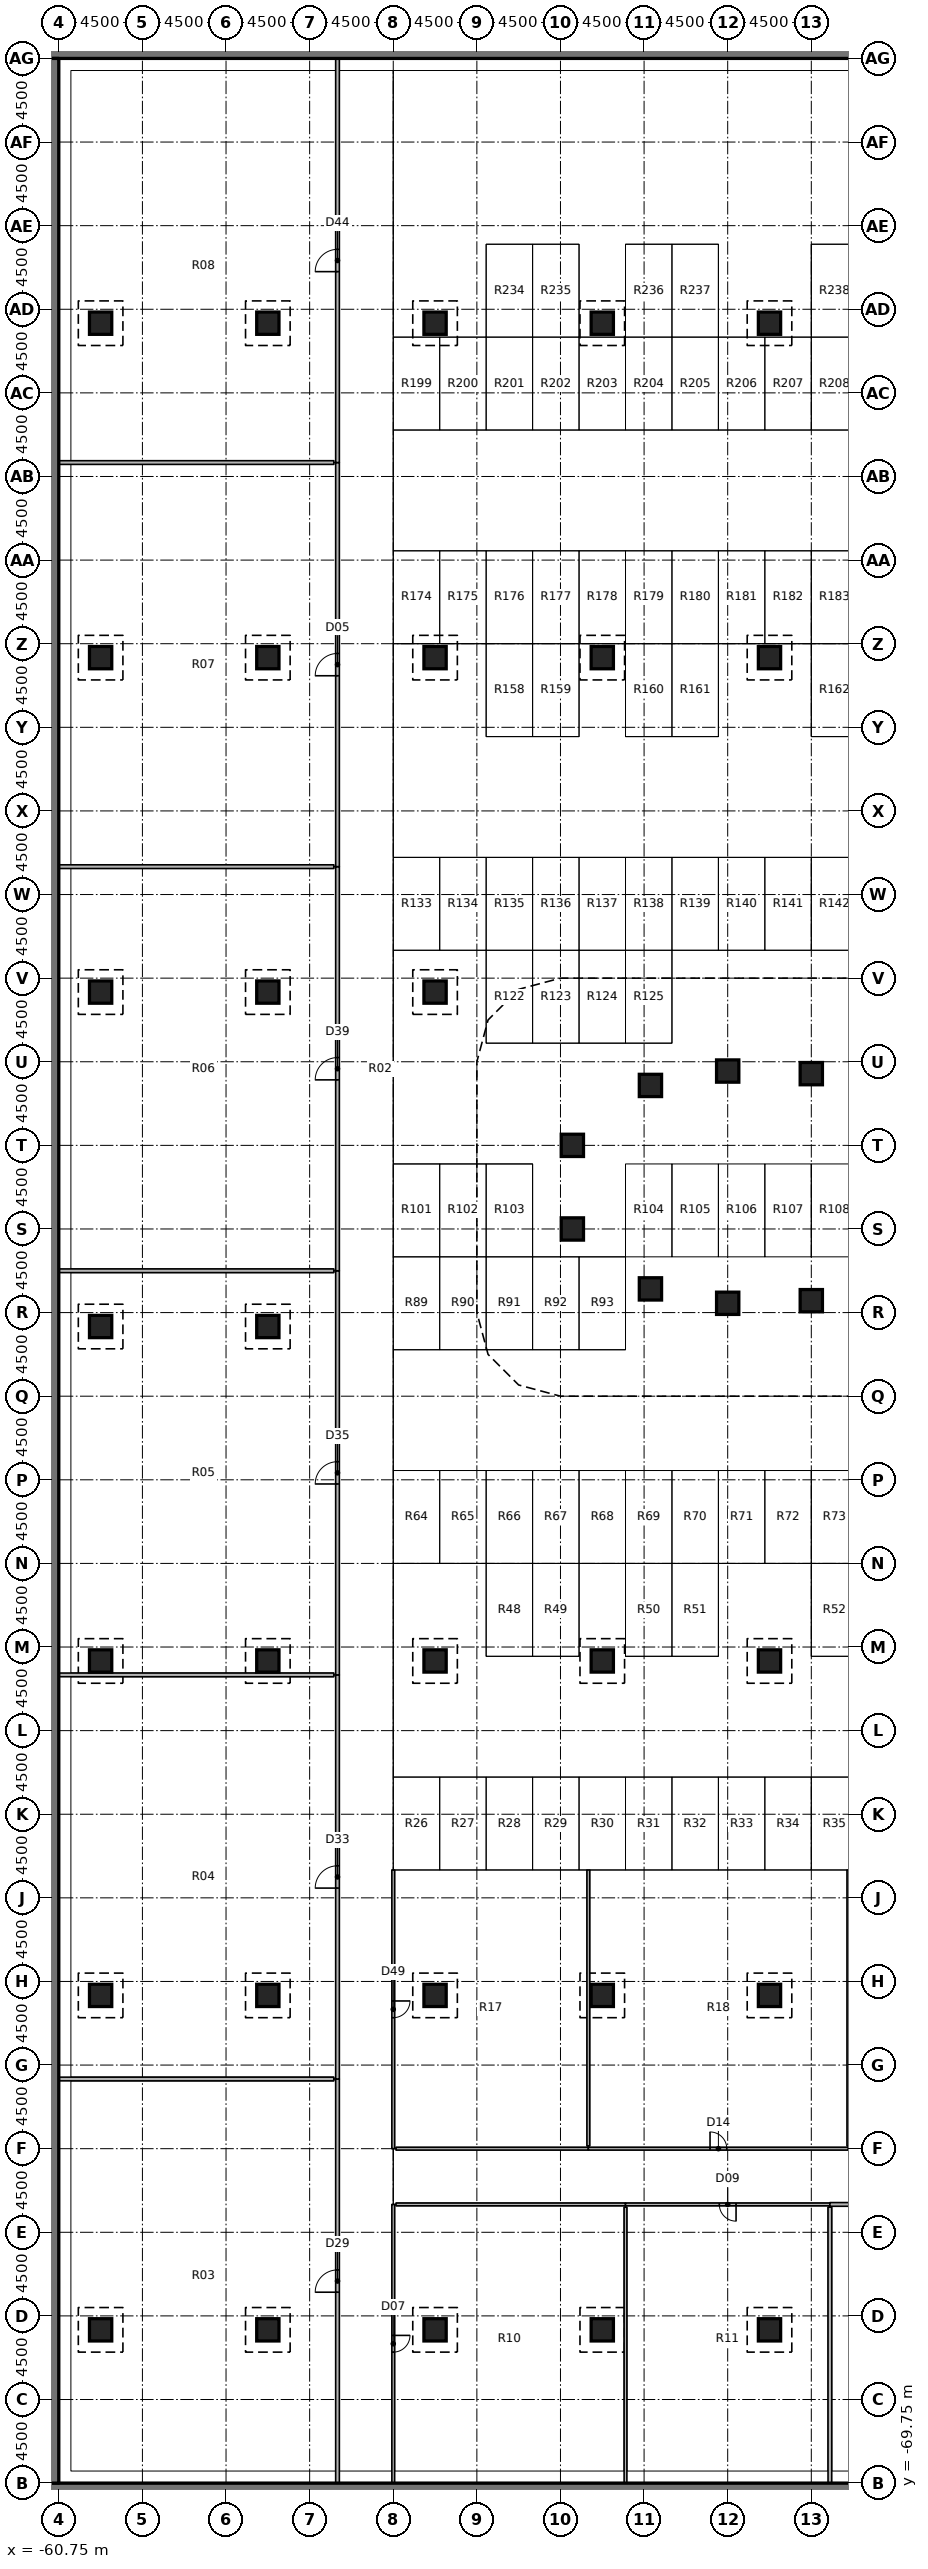
"""IFC4 building model, lengths in metres.
Left out: names, types, materials, properties, quantities, classifications, styles, units other than length and angle.
Written with IfcOpenShell. Run it as: python <this file> out.ifc"""

import sys

from ifc_helpers import new_model, si_unit, direction, frame, frame_2d, origin, origin_2d, place, context, subcontext, project, spatial, rectangle, extrude, element, fill, save


model = new_model("IFC4")
c1 = context("Model", 3, precision=1e-05, world=origin(), true_north=direction((0.0, 1.0)))
c2 = subcontext(c1, "Body", "Model", "MODEL_VIEW")
j1 = project(units=[si_unit("LENGTHUNIT", "METRE"), si_unit("PLANEANGLEUNIT", "RADIAN")], contexts=[c1])
p1 = place(None, origin())
s1 = spatial("IfcSite", under=j1, at=p1, CompositionType="ELEMENT")
p2 = place(p1, origin())
s2 = spatial("IfcBuilding", under=s1, at=p2, CompositionType="ELEMENT")
p3 = place(p2, frame((0.0, 0.0, -8.0)))
s3 = spatial("IfcBuildingStorey", under=s2, at=p3, CompositionType="ELEMENT", Elevation=-8.0)
for number, where, z_axis, x_axis in (
    (1, (-58.5, -61.5, 0.0), (0.0, 0.0, 1.0), (1.0, 0.0, 0.0)),
    (2, (-58.5, -43.5, 0.0), (0.0, 0.0, 1.0), (1.0, 0.0, 0.0)),
    (3, (-58.5, -25.5, 0.0), (0.0, 0.0, 1.0), (1.0, 0.0, 0.0)),
    (4, (-58.5, -7.5, 0.0), (0.0, 0.0, 1.0), (1.0, 0.0, 0.0)),
    (5, (-58.5, 10.5, 0.0), (0.0, 0.0, 1.0), (1.0, 0.0, 0.0)),
    (6, (-58.5, 28.5, 0.0), (0.0, 0.0, 1.0), (1.0, 0.0, 0.0)),
    (7, (-58.5, 46.5, 0.0), (0.0, 0.0, 1.0), (1.0, 0.0, 0.0)),
    (8, (-49.5, -61.5, 0.0), (0.0, 0.0, 1.0), (1.0, 0.0, 0.0)),
    (9, (-49.5, -43.5, 0.0), (0.0, 0.0, 1.0), (1.0, 0.0, 0.0)),
    (10, (-49.5, -25.5, 0.0), (0.0, 0.0, 1.0), (1.0, 0.0, 0.0)),
    (11, (-49.5, -7.5, 0.0), (0.0, 0.0, 1.0), (1.0, 0.0, 0.0)),
    (12, (-49.5, 10.5, 0.0), (0.0, 0.0, 1.0), (1.0, 0.0, 0.0)),
    (13, (-49.5, 28.5, 0.0), (0.0, 0.0, 1.0), (1.0, 0.0, 0.0)),
    (14, (-49.5, 46.5, 0.0), (0.0, 0.0, 1.0), (1.0, 0.0, 0.0)),
    (15, (-40.5, -61.5, 0.0), (0.0, 0.0, 1.0), (1.0, 0.0, 0.0)),
    (16, (-40.5, -43.5, 0.0), (0.0, 0.0, 1.0), (1.0, 0.0, 0.0)),
    (17, (-40.5, -25.5, 0.0), (0.0, 0.0, 1.0), (1.0, 0.0, 0.0)),
    (18, (-40.5, 10.5, 0.0), (0.0, 0.0, 1.0), (1.0, 0.0, 0.0)),
    (19, (-40.5, 28.5, 0.0), (0.0, 0.0, 1.0), (1.0, 0.0, 0.0)),
    (20, (-40.5, 46.5, 0.0), (0.0, 0.0, 1.0), (1.0, 0.0, 0.0)),
    (21, (-33.11, -2.25, 0.0), (0.0, 0.0, 1.0), (1.0, 0.0, 0.0)),
    (22, (-33.11, 2.25, 0.0), (0.0, 0.0, 1.0), (1.0, 0.0, 0.0)),
    (23, (-31.5, -61.5, 0.0), (0.0, 0.0, 1.0), (1.0, 0.0, 0.0)),
    (24, (-31.5, -43.5, 0.0), (0.0, 0.0, 1.0), (1.0, 0.0, 0.0)),
    (25, (-31.5, -25.5, 0.0), (0.0, 0.0, 1.0), (1.0, 0.0, 0.0)),
    (26, (-31.5, 28.5, 0.0), (0.0, 0.0, 1.0), (1.0, 0.0, 0.0)),
    (27, (-31.5, 46.5, 0.0), (0.0, 0.0, 1.0), (1.0, 0.0, 0.0)),
    (28, (-28.908, -5.475, 0.0), (0.0, 0.0, 1.0), (1.0, 0.0, 0.0)),
    (29, (-28.908, 5.475, 0.0), (0.0, 0.0, 1.0), (1.0, 0.0, 0.0)),
    (30, (-24.75, -6.25, 0.0), (0.0, 0.0, 1.0), (1.0, 0.0, 0.0)),
    (31, (-24.75, 6.25, 0.0), (0.0, 0.0, 1.0), (1.0, 0.0, 0.0)),
    (32, (-22.5, -61.5, 0.0), (0.0, 0.0, 1.0), (1.0, 0.0, 0.0)),
    (33, (-22.5, -43.5, 0.0), (0.0, 0.0, 1.0), (1.0, 0.0, 0.0)),
    (34, (-22.5, -25.5, 0.0), (0.0, 0.0, 1.0), (1.0, 0.0, 0.0)),
    (35, (-22.5, 28.5, 0.0), (0.0, 0.0, 1.0), (1.0, 0.0, 0.0)),
    (36, (-22.5, 46.5, 0.0), (0.0, 0.0, 1.0), (1.0, 0.0, 0.0)),
    (37, (-20.25, -6.11, 0.0), (0.0, 0.0, 1.0), (1.0, 0.0, 0.0)),
    (38, (-20.25, 6.11, 0.0), (0.0, 0.0, 1.0), (1.0, 0.0, 0.0)),
):
    element("IfcColumn", number, at=place(p3, frame(where, z_axis=z_axis, x_axis=x_axis)), inside=s3, PredefinedType="COLUMN", context=c2, shape_type="SweptSolid", body=[
        extrude(rectangle(XDim=1.2, YDim=1.2, at=origin_2d()), origin(), (0.0, 0.0, 1.0), 3.4),
    ])
for number, where, z_axis, x_axis in (
    (39, (-61.25, -70.0, 0.0), (0.0, 0.0, 1.0), (1.0, 0.0, 0.0)),
    (40, (-61.25, 61.0, 0.0), (0.0, 0.0, 1.0), (1.0, 0.0, 0.0)),
):
    element("IfcWall", number, at=place(p3, frame(where, z_axis=z_axis, x_axis=x_axis)), inside=s3, PredefinedType="SOLIDWALL", context=c2, shape_type="SweptSolid", body=[
        extrude(rectangle(XDim=122.5, YDim=0.5, at=frame_2d((61.25, 0.0))), origin(), (0.0, 0.0, 1.0), 4.0),
    ])
p4 = place(p3, frame((-61.0, -69.75, 0.0), z_axis=(0.0, 0.0, 1.0), x_axis=(0.0, 1.0, 0.0)))
e41 = element("IfcWall", 41, at=p4, inside=s3, PredefinedType="SOLIDWALL", context=c2, shape_type="SweptSolid", body=[
    extrude(rectangle(XDim=130.5, YDim=0.5, at=frame_2d((65.25, 0.0))), origin(), (0.0, 0.0, 1.0), 4.0),
])
p5 = place(p3, frame((-45.75, -69.75, 0.0), z_axis=(0.0, 0.0, 1.0), x_axis=(0.0, 1.0, 0.0)))
e42 = element("IfcWall", 42, at=p5, inside=s3, PredefinedType="PARTITIONING", context=c2, shape_type="SweptSolid", body=[
    extrude(rectangle(XDim=21.75, YDim=0.2, at=frame_2d((10.875, 0.0))), origin(), (0.0, 0.0, 1.0), 3.4),
])
p6 = place(p5, frame((10.275, 0.0, 0.0)))
e43 = element("IfcOpeningElement", 43, at=p6, cuts=e42, PredefinedType="OPENING", context=c2, shape_type="SweptSolid", body=[
    extrude(rectangle(XDim=1.2, YDim=2.1, at=frame_2d((0.6, 1.05))), frame((0.0, 0.11, 0.0), z_axis=(0.0, -1.0, 0.0), x_axis=(1.0, 0.0, 0.0)), (0.0, 0.0, 1.0), 0.22),
])
p7 = place(p3, frame((-45.75, -48.0, 0.0), z_axis=(0.0, 0.0, 1.0), x_axis=(0.0, 1.0, 0.0)))
e44 = element("IfcWall", 44, at=p7, inside=s3, PredefinedType="PARTITIONING", context=c2, shape_type="SweptSolid", body=[
    extrude(rectangle(XDim=21.75, YDim=0.2, at=frame_2d((10.875, 0.0))), origin(), (0.0, 0.0, 1.0), 3.4),
])
p8 = place(p7, frame((10.275, 0.0, 0.0)))
e45 = element("IfcOpeningElement", 45, at=p8, cuts=e44, PredefinedType="OPENING", context=c2, shape_type="SweptSolid", body=[
    extrude(rectangle(XDim=1.2, YDim=2.1, at=frame_2d((0.6, 1.05))), frame((0.0, 0.11, 0.0), z_axis=(0.0, -1.0, 0.0), x_axis=(1.0, 0.0, 0.0)), (0.0, 0.0, 1.0), 0.22),
])
p9 = place(p3, frame((-45.75, -26.25, 0.0), z_axis=(0.0, 0.0, 1.0), x_axis=(0.0, 1.0, 0.0)))
e46 = element("IfcWall", 46, at=p9, inside=s3, PredefinedType="PARTITIONING", context=c2, shape_type="SweptSolid", body=[
    extrude(rectangle(XDim=21.75, YDim=0.2, at=frame_2d((10.875, 0.0))), origin(), (0.0, 0.0, 1.0), 3.4),
])
p10 = place(p9, frame((10.275, 0.0, 0.0)))
e47 = element("IfcOpeningElement", 47, at=p10, cuts=e46, PredefinedType="OPENING", context=c2, shape_type="SweptSolid", body=[
    extrude(rectangle(XDim=1.2, YDim=2.1, at=frame_2d((0.6, 1.05))), frame((0.0, 0.11, 0.0), z_axis=(0.0, -1.0, 0.0), x_axis=(1.0, 0.0, 0.0)), (0.0, 0.0, 1.0), 0.22),
])
p11 = place(p3, frame((-45.75, -4.5, 0.0), z_axis=(0.0, 0.0, 1.0), x_axis=(0.0, 1.0, 0.0)))
e48 = element("IfcWall", 48, at=p11, inside=s3, PredefinedType="PARTITIONING", context=c2, shape_type="SweptSolid", body=[
    extrude(rectangle(XDim=21.75, YDim=0.2, at=frame_2d((10.875, 0.0))), origin(), (0.0, 0.0, 1.0), 3.4),
])
p12 = place(p11, frame((10.275, 0.0, 0.0)))
e49 = element("IfcOpeningElement", 49, at=p12, cuts=e48, PredefinedType="OPENING", context=c2, shape_type="SweptSolid", body=[
    extrude(rectangle(XDim=1.2, YDim=2.1, at=frame_2d((0.6, 1.05))), frame((0.0, 0.11, 0.0), z_axis=(0.0, -1.0, 0.0), x_axis=(1.0, 0.0, 0.0)), (0.0, 0.0, 1.0), 0.22),
])
p13 = place(p3, frame((-45.75, 17.25, 0.0), z_axis=(0.0, 0.0, 1.0), x_axis=(0.0, 1.0, 0.0)))
e50 = element("IfcWall", 50, at=p13, inside=s3, PredefinedType="PARTITIONING", context=c2, shape_type="SweptSolid", body=[
    extrude(rectangle(XDim=21.75, YDim=0.2, at=frame_2d((10.875, 0.0))), origin(), (0.0, 0.0, 1.0), 3.4),
])
p14 = place(p13, frame((10.275, 0.0, 0.0)))
e51 = element("IfcOpeningElement", 51, at=p14, cuts=e50, PredefinedType="OPENING", context=c2, shape_type="SweptSolid", body=[
    extrude(rectangle(XDim=1.2, YDim=2.1, at=frame_2d((0.6, 1.05))), frame((0.0, 0.11, 0.0), z_axis=(0.0, -1.0, 0.0), x_axis=(1.0, 0.0, 0.0)), (0.0, 0.0, 1.0), 0.22),
])
p15 = place(p3, frame((-45.75, 39.0, 0.0), z_axis=(0.0, 0.0, 1.0), x_axis=(0.0, 1.0, 0.0)))
e52 = element("IfcWall", 52, at=p15, inside=s3, PredefinedType="PARTITIONING", context=c2, shape_type="SweptSolid", body=[
    extrude(rectangle(XDim=21.75, YDim=0.2, at=frame_2d((10.875, 0.0))), origin(), (0.0, 0.0, 1.0), 3.4),
])
p16 = place(p15, frame((10.275, 0.0, 0.0)))
e53 = element("IfcOpeningElement", 53, at=p16, cuts=e52, PredefinedType="OPENING", context=c2, shape_type="SweptSolid", body=[
    extrude(rectangle(XDim=1.2, YDim=2.1, at=frame_2d((0.6, 1.05))), frame((0.0, 0.11, 0.0), z_axis=(0.0, -1.0, 0.0), x_axis=(1.0, 0.0, 0.0)), (0.0, 0.0, 1.0), 0.22),
])
p17 = place(p3, frame((-42.75, -54.75, 0.0), z_axis=(0.0, 0.0, 1.0), x_axis=(0.0, -1.0, 0.0)))
e54 = element("IfcWall", 54, at=p17, inside=s3, PredefinedType="PARTITIONING", context=c2, shape_type="SweptSolid", body=[
    extrude(rectangle(XDim=15.0, YDim=0.15, at=frame_2d((7.5, 0.0))), origin(), (0.0, 0.0, 1.0), 3.4),
])
p18 = place(p17, frame((7.05, 0.0, 0.0)))
e55 = element("IfcOpeningElement", 55, at=p18, cuts=e54, PredefinedType="OPENING", context=c2, shape_type="SweptSolid", body=[
    extrude(rectangle(XDim=0.9, YDim=2.1, at=frame_2d((0.45, 1.05))), frame((0.0, 0.085, 0.0), z_axis=(0.0, -1.0, 0.0), x_axis=(1.0, 0.0, 0.0)), (0.0, 0.0, 1.0), 0.17),
])
p19 = place(p3, frame((-42.75, -36.75, 0.0), z_axis=(0.0, 0.0, 1.0), x_axis=(0.0, -1.0, 0.0)))
e56 = element("IfcWall", 56, at=p19, inside=s3, PredefinedType="PARTITIONING", context=c2, shape_type="SweptSolid", body=[
    extrude(rectangle(XDim=15.0, YDim=0.15, at=frame_2d((7.5, 0.0))), origin(), (0.0, 0.0, 1.0), 3.4),
])
p20 = place(p19, frame((7.05, 0.0, 0.0)))
e57 = element("IfcOpeningElement", 57, at=p20, cuts=e56, PredefinedType="OPENING", context=c2, shape_type="SweptSolid", body=[
    extrude(rectangle(XDim=0.9, YDim=2.1, at=frame_2d((0.45, 1.05))), frame((0.0, 0.085, 0.0), z_axis=(0.0, -1.0, 0.0), x_axis=(1.0, 0.0, 0.0)), (0.0, 0.0, 1.0), 0.17),
])
for number, where, z_axis, x_axis in (
    (58, (-60.75, -48.0, 0.0), (0.0, 0.0, 1.0), (1.0, 0.0, 0.0)),
    (59, (-60.75, -26.25, 0.0), (0.0, 0.0, 1.0), (1.0, 0.0, 0.0)),
    (60, (-60.75, -4.5, 0.0), (0.0, 0.0, 1.0), (1.0, 0.0, 0.0)),
    (61, (-60.75, 17.25, 0.0), (0.0, 0.0, 1.0), (1.0, 0.0, 0.0)),
    (62, (-60.75, 39.0, 0.0), (0.0, 0.0, 1.0), (1.0, 0.0, 0.0)),
):
    element("IfcWall", number, at=place(p3, frame(where, z_axis=z_axis, x_axis=x_axis)), inside=s3, PredefinedType="PARTITIONING", context=c2, shape_type="SweptSolid", body=[
        extrude(rectangle(XDim=14.8, YDim=0.2, at=frame_2d((7.4, 0.0))), origin(), (0.0, 0.0, 1.0), 3.4),
    ])
p21 = place(p3, frame((-30.25, -54.75, 0.0), z_axis=(0.0, 0.0, 1.0), x_axis=(-1.0, 0.0, 0.0)))
e63 = element("IfcWall", 63, at=p21, inside=s3, PredefinedType="PARTITIONING", context=c2, shape_type="SweptSolid", body=[
    extrude(rectangle(XDim=12.35, YDim=0.15, at=frame_2d((6.175, 0.0))), origin(), (0.0, 0.0, 1.0), 3.4),
])
p22 = place(p3, frame((-19.25, -54.75, 0.0), z_axis=(0.0, 0.0, 1.0), x_axis=(-1.0, 0.0, 0.0)))
e64 = element("IfcWall", 64, at=p22, inside=s3, PredefinedType="PARTITIONING", context=c2, shape_type="SweptSolid", body=[
    extrude(rectangle(XDim=11.0, YDim=0.15, at=frame_2d((5.5, 0.0))), origin(), (0.0, 0.0, 1.0), 3.4),
])
p23 = place(p22, frame((5.05, 0.0, 0.0)))
e65 = element("IfcOpeningElement", 65, at=p23, cuts=e64, PredefinedType="OPENING", context=c2, shape_type="SweptSolid", body=[
    extrude(rectangle(XDim=0.9, YDim=2.1, at=frame_2d((0.45, 1.05))), frame((0.0, 0.085, 0.0), z_axis=(0.0, -1.0, 0.0), x_axis=(1.0, 0.0, 0.0)), (0.0, 0.0, 1.0), 0.17),
])
p24 = place(p3, frame((-3.25, -54.75, 0.0), z_axis=(0.0, 0.0, 1.0), x_axis=(-1.0, 0.0, 0.0)))
e66 = element("IfcWall", 66, at=p24, inside=s3, PredefinedType="PARTITIONING", context=c2, shape_type="SweptSolid", body=[
    extrude(rectangle(XDim=16.0, YDim=0.2, at=frame_2d((8.0, 0.0))), origin(), (0.0, 0.0, 1.0), 3.4),
])
p25 = place(p24, frame((7.55, 0.0, 0.0)))
e67 = element("IfcOpeningElement", 67, at=p25, cuts=e66, PredefinedType="OPENING", context=c2, shape_type="SweptSolid", body=[
    extrude(rectangle(XDim=0.9, YDim=2.1, at=frame_2d((0.45, 1.05))), frame((0.0, 0.11, 0.0), z_axis=(0.0, -1.0, 0.0), x_axis=(1.0, 0.0, 0.0)), (0.0, 0.0, 1.0), 0.22),
])
p26 = place(p3, frame((-42.6, -51.75, 0.0), z_axis=(0.0, 0.0, 1.0), x_axis=(1.0, 0.0, 0.0)))
e68 = element("IfcWall", 68, at=p26, inside=s3, PredefinedType="PARTITIONING", context=c2, shape_type="SweptSolid", body=[
    extrude(rectangle(XDim=10.35, YDim=0.15, at=frame_2d((5.175, 0.0))), origin(), (0.0, 0.0, 1.0), 3.4),
])
p27 = place(p3, frame((-32.25, -51.75, 0.0), z_axis=(0.0, 0.0, 1.0), x_axis=(1.0, 0.0, 0.0)))
e69 = element("IfcWall", 69, at=p27, inside=s3, PredefinedType="PARTITIONING", context=c2, shape_type="SweptSolid", body=[
    extrude(rectangle(XDim=14.0, YDim=0.15, at=frame_2d((7.0, 0.0))), origin(), (0.0, 0.0, 1.0), 3.4),
])
p28 = place(p27, frame((6.55, 0.0, 0.0)))
e70 = element("IfcOpeningElement", 70, at=p28, cuts=e69, PredefinedType="OPENING", context=c2, shape_type="SweptSolid", body=[
    extrude(rectangle(XDim=0.9, YDim=2.1, at=frame_2d((0.45, 1.05))), frame((0.0, 0.085, 0.0), z_axis=(0.0, -1.0, 0.0), x_axis=(1.0, 0.0, 0.0)), (0.0, 0.0, 1.0), 0.17),
])
p29 = place(p3, frame((-30.25, -54.9, 0.0), z_axis=(0.0, 0.0, 1.0), x_axis=(0.0, -1.0, 0.0)))
e71 = element("IfcWall", 71, at=p29, inside=s3, PredefinedType="PARTITIONING", context=c2, shape_type="SweptSolid", body=[
    extrude(rectangle(XDim=14.85, YDim=0.15, at=frame_2d((7.425, 0.0))), origin(), (0.0, 0.0, 1.0), 3.4),
])
p30 = place(p3, frame((-19.25, -54.9, 0.0), z_axis=(0.0, 0.0, 1.0), x_axis=(0.0, -1.0, 0.0)))
e72 = element("IfcWall", 72, at=p30, inside=s3, PredefinedType="PARTITIONING", context=c2, shape_type="SweptSolid", body=[
    extrude(rectangle(XDim=14.85, YDim=0.2, at=frame_2d((7.425, 0.0))), origin(), (0.0, 0.0, 1.0), 3.4),
])
for number, where, z_axis, x_axis in (
    (73, (-32.25, -36.75, 0.0), (0.0, 0.0, 1.0), (0.0, -1.0, 0.0)),
    (74, (-18.25, -36.75, 0.0), (0.0, 0.0, 1.0), (0.0, -1.0, 0.0)),
):
    element("IfcWall", number, at=place(p3, frame(where, z_axis=z_axis, x_axis=x_axis)), inside=s3, PredefinedType="PARTITIONING", context=c2, shape_type="SweptSolid", body=[
        extrude(rectangle(XDim=14.85, YDim=0.15, at=frame_2d((7.425, 0.0))), origin(), (0.0, 0.0, 1.0), 3.4),
    ])
p31 = place(p6, origin())
e75 = element("IfcDoor", 75, at=p31, inside=s3, OperationType="SINGLE_SWING_LEFT", PredefinedType="DOOR", context=c2, shape_type="SweptSolid", body=[
    extrude(rectangle(XDim=1.2, YDim=2.1, at=frame_2d((0.6, 1.05))), frame((0.0, 0.025, 0.0), z_axis=(0.0, -1.0, 0.0), x_axis=(1.0, 0.0, 0.0)), (0.0, 0.0, 1.0), 0.05),
])
fill(e43, e75)
p32 = place(p8, origin())
e76 = element("IfcDoor", 76, at=p32, inside=s3, OperationType="SINGLE_SWING_LEFT", PredefinedType="DOOR", context=c2, shape_type="SweptSolid", body=[
    extrude(rectangle(XDim=1.2, YDim=2.1, at=frame_2d((0.6, 1.05))), frame((0.0, 0.025, 0.0), z_axis=(0.0, -1.0, 0.0), x_axis=(1.0, 0.0, 0.0)), (0.0, 0.0, 1.0), 0.05),
])
fill(e45, e76)
p33 = place(p10, origin())
e77 = element("IfcDoor", 77, at=p33, inside=s3, OperationType="SINGLE_SWING_LEFT", PredefinedType="DOOR", context=c2, shape_type="SweptSolid", body=[
    extrude(rectangle(XDim=1.2, YDim=2.1, at=frame_2d((0.6, 1.05))), frame((0.0, 0.025, 0.0), z_axis=(0.0, -1.0, 0.0), x_axis=(1.0, 0.0, 0.0)), (0.0, 0.0, 1.0), 0.05),
])
fill(e47, e77)
p34 = place(p12, origin())
e78 = element("IfcDoor", 78, at=p34, inside=s3, OperationType="SINGLE_SWING_LEFT", PredefinedType="DOOR", context=c2, shape_type="SweptSolid", body=[
    extrude(rectangle(XDim=1.2, YDim=2.1, at=frame_2d((0.6, 1.05))), frame((0.0, 0.025, 0.0), z_axis=(0.0, -1.0, 0.0), x_axis=(1.0, 0.0, 0.0)), (0.0, 0.0, 1.0), 0.05),
])
fill(e49, e78)
p35 = place(p14, origin())
e79 = element("IfcDoor", 79, at=p35, inside=s3, OperationType="SINGLE_SWING_LEFT", PredefinedType="DOOR", context=c2, shape_type="SweptSolid", body=[
    extrude(rectangle(XDim=1.2, YDim=2.1, at=frame_2d((0.6, 1.05))), frame((0.0, 0.025, 0.0), z_axis=(0.0, -1.0, 0.0), x_axis=(1.0, 0.0, 0.0)), (0.0, 0.0, 1.0), 0.05),
])
fill(e51, e79)
p36 = place(p16, origin())
e80 = element("IfcDoor", 80, at=p36, inside=s3, OperationType="SINGLE_SWING_LEFT", PredefinedType="DOOR", context=c2, shape_type="SweptSolid", body=[
    extrude(rectangle(XDim=1.2, YDim=2.1, at=frame_2d((0.6, 1.05))), frame((0.0, 0.025, 0.0), z_axis=(0.0, -1.0, 0.0), x_axis=(1.0, 0.0, 0.0)), (0.0, 0.0, 1.0), 0.05),
])
fill(e53, e80)
p37 = place(p18, origin())
e81 = element("IfcDoor", 81, at=p37, inside=s3, OperationType="SINGLE_SWING_LEFT", PredefinedType="DOOR", context=c2, shape_type="SweptSolid", body=[
    extrude(rectangle(XDim=0.9, YDim=2.1, at=frame_2d((0.45, 1.05))), frame((0.0, 0.025, 0.0), z_axis=(0.0, -1.0, 0.0), x_axis=(1.0, 0.0, 0.0)), (0.0, 0.0, 1.0), 0.05),
])
fill(e55, e81)
p38 = place(p20, origin())
e82 = element("IfcDoor", 82, at=p38, inside=s3, OperationType="SINGLE_SWING_LEFT", PredefinedType="DOOR", context=c2, shape_type="SweptSolid", body=[
    extrude(rectangle(XDim=0.9, YDim=2.1, at=frame_2d((0.45, 1.05))), frame((0.0, 0.025, 0.0), z_axis=(0.0, -1.0, 0.0), x_axis=(1.0, 0.0, 0.0)), (0.0, 0.0, 1.0), 0.05),
])
fill(e57, e82)
p39 = place(p23, origin())
e83 = element("IfcDoor", 83, at=p39, inside=s3, OperationType="SINGLE_SWING_LEFT", PredefinedType="DOOR", context=c2, shape_type="SweptSolid", body=[
    extrude(rectangle(XDim=0.9, YDim=2.1, at=frame_2d((0.45, 1.05))), frame((0.0, 0.025, 0.0), z_axis=(0.0, -1.0, 0.0), x_axis=(1.0, 0.0, 0.0)), (0.0, 0.0, 1.0), 0.05),
])
fill(e65, e83)
p40 = place(p28, origin())
e84 = element("IfcDoor", 84, at=p40, inside=s3, OperationType="SINGLE_SWING_LEFT", PredefinedType="DOOR", context=c2, shape_type="SweptSolid", body=[
    extrude(rectangle(XDim=0.9, YDim=2.1, at=frame_2d((0.45, 1.05))), frame((0.0, 0.025, 0.0), z_axis=(0.0, -1.0, 0.0), x_axis=(1.0, 0.0, 0.0)), (0.0, 0.0, 1.0), 0.05),
])
fill(e70, e84)
save(model, sys.argv[1])
